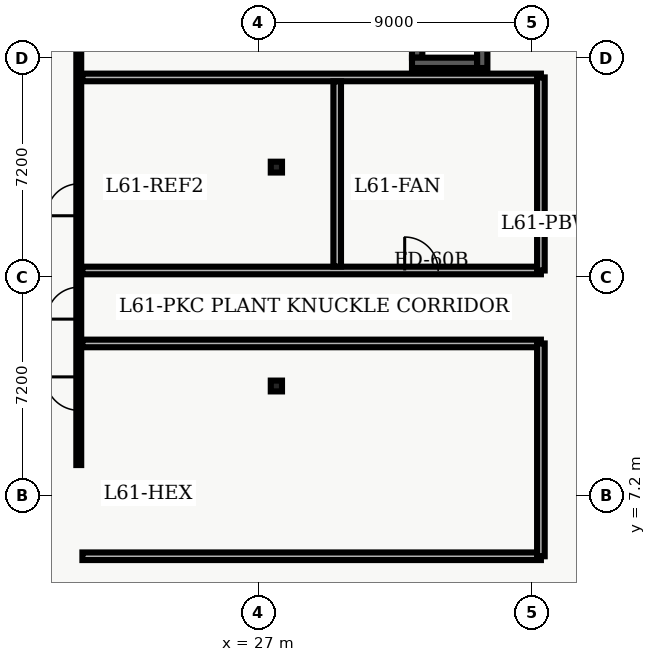
"""IFC4 building model, lengths in metres.
Left out: names, types, materials, properties, quantities, classifications, styles, units other than length and angle.
Written with IfcOpenShell. Run it as: python <this file> out.ifc"""

import sys

from ifc_helpers import new_model, entity, si_unit, converted_unit, direction, frame, origin_with_axes, origin_2d_with_axis, place, context, subcontext, project, spatial, polyline, rectangle, i_section, outline, extrude, element, fill, save


model = new_model("IFC4")
c1 = context("Model", 3, precision=1e-05, world=origin_with_axes(), true_north=direction((0.0, 1.0)))
c2 = subcontext(c1, "Body", "Model", "MODEL_VIEW")
j1 = project(units=[si_unit("LENGTHUNIT", "METRE"), converted_unit("PLANEANGLEUNIT", "DEGREE", entity("IfcPlaneAngleMeasure", 0.017), si_unit("PLANEANGLEUNIT", "RADIAN"), dimensions=[0, 0, 0, 0, 0, 0, 0])], contexts=[c1])
p1 = place(None, origin_with_axes())
s1 = spatial("IfcSite", under=j1, at=p1, CompositionType="ELEMENT")
p2 = place(p1, origin_with_axes())
s2 = spatial("IfcBuilding", under=s1, at=p2, CompositionType="ELEMENT")
p3 = place(p2, frame((0.0, 0.0, 248.1), z_axis=(0.0, 0.0, 1.0), x_axis=(1.0, 0.0, 0.0)))
s3 = spatial("IfcBuildingStorey", under=s2, at=p3, CompositionType="ELEMENT", Elevation=248.1)
for number, where, z_axis, x_axis in (
    (1, (27.6, 10.8, 0.0), (0.0, 0.0, 1.0), (1.0, 0.0, 0.0)),
    (2, (27.6, 18.0, 0.0), (0.0, 0.0, 1.0), (1.0, 0.0, 0.0)),
):
    element("IfcColumn", number, at=place(p3, frame(where, z_axis=z_axis, x_axis=x_axis)), inside=s3, PredefinedType="COLUMN", context=c2, shape_type="SweptSolid", body=[
        extrude(i_section(OverallWidth=0.369, OverallDepth=0.356, WebThickness=0.011, FlangeThickness=0.018, FilletRadius=0.018, at=origin_2d_with_axis()), origin_with_axes(), (0.0, 0.0, 1.0), 4.8),
    ])
p4 = place(p3, frame((21.1, 8.2, 0.0), z_axis=(0.0, 0.0, 1.0), x_axis=(0.0, 1.0, 0.0)))
e3 = element("IfcWall", 3, at=p4, inside=s3, PredefinedType="PARTITIONING", context=c2, shape_type="SweptSolid", body=[
    extrude(outline(polyline([(0.0, -0.08), (32.0, -0.08), (32.0, 0.08), (0.0, 0.08), (0.0, -0.08)])), origin_with_axes(), (0.0, 0.0, 1.0), 3.2),
])
p5 = place(p4, frame((8.725, 0.0, 0.0), z_axis=(0.0, 0.0, 1.0), x_axis=(1.0, 0.0, 0.0)))
e4 = element("IfcOpeningElement", 4, at=p5, cuts=e3, PredefinedType="OPENING", context=c2, shape_type="SweptSolid", body=[
    extrude(rectangle(XDim=1.05, YDim=0.18, at=origin_2d_with_axis()), origin_with_axes(), (0.0, 0.0, 1.0), 2.15),
])
p6 = place(p4, frame((5.325, 0.0, 0.0), z_axis=(0.0, 0.0, 1.0), x_axis=(1.0, 0.0, 0.0)))
e5 = element("IfcOpeningElement", 5, at=p6, cuts=e3, PredefinedType="OPENING", context=c2, shape_type="SweptSolid", body=[
    extrude(rectangle(XDim=1.05, YDim=0.18, at=origin_2d_with_axis()), origin_with_axes(), (0.0, 0.0, 1.0), 2.15),
])
p7 = place(p4, frame((2.35, 0.0, 0.0), z_axis=(0.0, 0.0, 1.0), x_axis=(1.0, 0.0, 0.0)))
e6 = element("IfcOpeningElement", 6, at=p7, cuts=e3, PredefinedType="OPENING", context=c2, shape_type="SweptSolid", body=[
    extrude(rectangle(XDim=1.1, YDim=0.18, at=origin_2d_with_axis()), origin_with_axes(), (0.0, 0.0, 1.0), 2.15),
])
for number, where, z_axis, x_axis in (
    (7, (21.22, 20.95, 0.0), (0.0, 0.0, 1.0), (1.0, 0.0, 0.0)),
    (8, (21.22, 12.2, 0.0), (0.0, 0.0, 1.0), (1.0, 0.0, 0.0)),
):
    element("IfcWall", number, at=place(p3, frame(where, z_axis=z_axis, x_axis=x_axis)), inside=s3, PredefinedType="SOLIDWALL", context=c2, shape_type="SweptSolid", body=[
        extrude(outline(polyline([(0.0, -0.125), (15.08, -0.125), (15.08, 0.125), (0.0, 0.125), (0.0, -0.125)])), origin_with_axes(), (0.0, 0.0, 1.0), 3.2),
    ])
p8 = place(p3, frame((21.22, 14.6, 0.0), z_axis=(0.0, 0.0, 1.0), x_axis=(1.0, 0.0, 0.0)))
e9 = element("IfcWall", 9, at=p8, inside=s3, PredefinedType="SOLIDWALL", context=c2, shape_type="SweptSolid", body=[
    extrude(outline(polyline([(0.0, -0.125), (15.08, -0.125), (15.08, 0.125), (0.0, 0.125), (0.0, -0.125)])), origin_with_axes(), (0.0, 0.0, 1.0), 3.2),
])
p9 = place(p8, frame((11.15, 0.0, 0.0), z_axis=(0.0, 0.0, 1.0), x_axis=(1.0, 0.0, 0.0)))
e10 = element("IfcOpeningElement", 10, at=p9, cuts=e9, PredefinedType="OPENING", context=c2, shape_type="SweptSolid", body=[
    extrude(rectangle(XDim=1.1, YDim=0.27, at=origin_2d_with_axis()), origin_with_axes(), (0.0, 0.0, 1.0), 2.15),
])
p10 = place(p3, frame((36.3, 14.6, 0.0), z_axis=(0.0, 0.0, 1.0), x_axis=(0.0, 1.0, 0.0)))
e11 = element("IfcWall", 11, at=p10, inside=s3, PredefinedType="SOLIDWALL", context=c2, shape_type="SweptSolid", body=[
    extrude(outline(polyline([(0.0, -0.125), (6.35, -0.125), (6.35, 0.125), (0.0, 0.125), (0.0, -0.125)])), origin_with_axes(), (0.0, 0.0, 1.0), 3.2),
])
p11 = place(p3, frame((29.6, 14.73, 0.0), z_axis=(0.0, 0.0, 1.0), x_axis=(0.0, 1.0, 0.0)))
e12 = element("IfcWall", 12, at=p11, inside=s3, PredefinedType="SOLIDWALL", context=c2, shape_type="SweptSolid", body=[
    extrude(outline(polyline([(0.0, -0.125), (6.09, -0.125), (6.09, 0.125), (0.0, 0.125), (0.0, -0.125)])), origin_with_axes(), (0.0, 0.0, 1.0), 3.2),
])
p12 = place(p3, frame((21.22, 5.2, 0.0), z_axis=(0.0, 0.0, 1.0), x_axis=(1.0, 0.0, 0.0)))
e13 = element("IfcWall", 13, at=p12, inside=s3, PredefinedType="SOLIDWALL", context=c2, shape_type="SweptSolid", body=[
    extrude(outline(polyline([(0.0, -0.125), (15.08, -0.125), (15.08, 0.125), (0.0, 0.125), (0.0, -0.125)])), origin_with_axes(), (0.0, 0.0, 1.0), 3.2),
])
p13 = place(p3, frame((36.3, 5.2, 0.0), z_axis=(0.0, 0.0, 1.0), x_axis=(0.0, 1.0, 0.0)))
e14 = element("IfcWall", 14, at=p13, inside=s3, PredefinedType="SOLIDWALL", context=c2, shape_type="SweptSolid", body=[
    extrude(outline(polyline([(0.0, -0.125), (7.0, -0.125), (7.0, 0.125), (0.0, 0.125), (0.0, -0.125)])), origin_with_axes(), (0.0, 0.0, 1.0), 3.2),
])
p14 = place(p3, frame((34.37, 21.26, 0.0), z_axis=(0.0, 0.0, 1.0), x_axis=(0.0, 1.0, 0.0)))
e15 = element("IfcWall", 15, at=p14, inside=s3, PredefinedType="SOLIDWALL", context=c2, shape_type="SweptSolid", body=[
    extrude(outline(polyline([(0.0, -0.17), (7.54, -0.17), (7.54, 0.17), (0.0, 0.17), (0.0, -0.17)])), origin_with_axes(), (0.0, 0.0, 1.0), 4.56),
])
p15 = place(p3, frame((32.23, 41.82, 0.0), z_axis=(0.0, 0.0, 1.0), x_axis=(0.0, -1.0, 0.0)))
e16 = element("IfcWall", 16, at=p15, inside=s3, PredefinedType="SOLIDWALL", context=c2, shape_type="SweptSolid", body=[
    extrude(outline(polyline([(0.0, -0.17), (20.22, -0.17), (20.22, 0.17), (0.0, 0.17), (0.0, -0.17)])), origin_with_axes(), (0.0, 0.0, 1.0), 4.56),
])
p16 = place(p3, frame((32.06, 21.43, 0.0), z_axis=(0.0, 0.0, 1.0), x_axis=(1.0, 0.0, 0.0)))
e17 = element("IfcWall", 17, at=p16, inside=s3, PredefinedType="SOLIDWALL", context=c2, shape_type="SweptSolid", body=[
    extrude(outline(polyline([(0.0, -0.17), (2.14, -0.17), (2.14, 0.17), (0.0, 0.17), (0.0, -0.17)])), origin_with_axes(), (0.0, 0.0, 1.0), 4.56),
])
p17 = place(p4, frame((8.725, 0.0, 0.0), z_axis=(0.0, 0.0, 1.0), x_axis=(1.0, 0.0, 0.0)))
e18 = element("IfcDoor", 18, at=p17, inside=s3, OperationType="SINGLE_SWING_LEFT", PredefinedType="DOOR", context=c2, shape_type="SweptSolid", body=[
    extrude(rectangle(XDim=1.05, YDim=0.09, at=origin_2d_with_axis()), origin_with_axes(), (0.0, 0.0, 1.0), 2.15),
])
fill(e4, e18)
p18 = place(p8, frame((11.15, 0.0, 0.0), z_axis=(0.0, 0.0, 1.0), x_axis=(1.0, 0.0, 0.0)))
e19 = element("IfcDoor", 19, at=p18, inside=s3, OperationType="SINGLE_SWING_LEFT", PredefinedType="DOOR", context=c2, shape_type="SweptSolid", body=[
    extrude(rectangle(XDim=1.1, YDim=0.09, at=origin_2d_with_axis()), origin_with_axes(), (0.0, 0.0, 1.0), 2.15),
])
fill(e10, e19)
p19 = place(p4, frame((5.325, 0.0, 0.0), z_axis=(0.0, 0.0, 1.0), x_axis=(1.0, 0.0, 0.0)))
e20 = element("IfcDoor", 20, at=p19, inside=s3, OperationType="SINGLE_SWING_LEFT", PredefinedType="DOOR", context=c2, shape_type="SweptSolid", body=[
    extrude(rectangle(XDim=1.05, YDim=0.09, at=origin_2d_with_axis()), origin_with_axes(), (0.0, 0.0, 1.0), 2.15),
])
fill(e5, e20)
p20 = place(p4, frame((2.35, 0.0, 0.0), z_axis=(0.0, 0.0, 1.0), x_axis=(1.0, 0.0, 0.0)))
e21 = element("IfcDoor", 21, at=p20, inside=s3, OperationType="SINGLE_SWING_RIGHT", PredefinedType="DOOR", context=c2, shape_type="SweptSolid", body=[
    extrude(rectangle(XDim=1.1, YDim=0.09, at=origin_2d_with_axis()), origin_with_axes(), (0.0, 0.0, 1.0), 2.15),
])
fill(e6, e21)
save(model, sys.argv[1])
